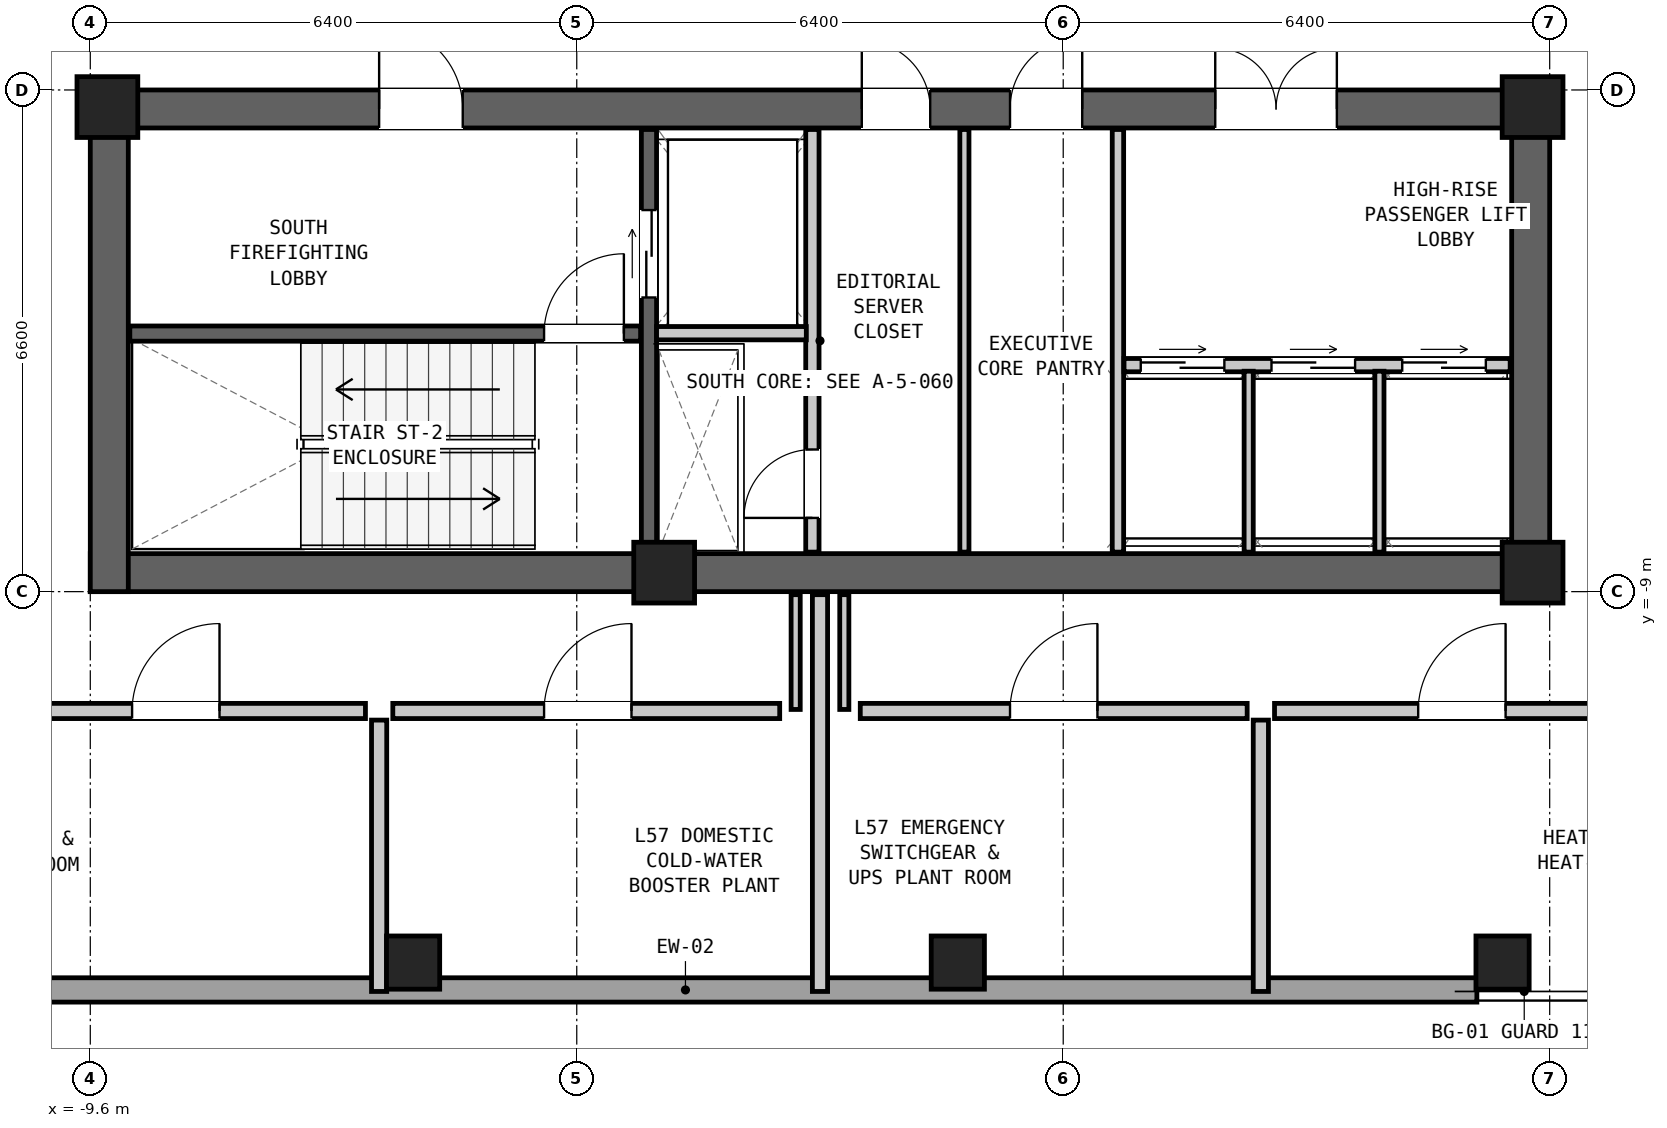
"""IFC4 building model, lengths in metres.
Left out: names, types, materials, properties, quantities, classifications, styles, units other than length and angle.
Written with IfcOpenShell. Run it as: python <this file> out.ifc"""

import sys

from ifc_helpers import new_model, si_unit, direction, frame, frame_2d, origin, origin_2d, place, context, subcontext, project, spatial, rectangle, hollow_rectangle, extrude, element, fill, save


model = new_model("IFC4")
c1 = context("Model", 3, precision=1e-05, world=origin(), true_north=direction((0.0, 1.0)))
c2 = subcontext(c1, "Body", "Model", "MODEL_VIEW")
j1 = project(units=[si_unit("LENGTHUNIT", "METRE"), si_unit("PLANEANGLEUNIT", "RADIAN")], contexts=[c1])
p1 = place(None, origin())
s1 = spatial("IfcSite", under=j1, at=p1, CompositionType="ELEMENT")
p2 = place(p1, origin())
s2 = spatial("IfcBuilding", under=s1, at=p2, CompositionType="ELEMENT")
p3 = place(p2, frame((0.0, 0.0, 195.15)))
s3 = spatial("IfcBuildingStorey", under=s2, at=p3, CompositionType="ELEMENT", Elevation=195.15)
p4 = place(p3, frame((-9.6, -8.75, 0.0), z_axis=(0.0, 0.0, 1.0), x_axis=(1.0, 0.0, 0.0)))
e1 = element("IfcWall", 1, at=p4, inside=s3, PredefinedType="SHEAR", context=c2, shape_type="SweptSolid", body=[
    extrude(rectangle(XDim=19.2, YDim=0.5, at=frame_2d((9.6, 0.0))), origin(), (0.0, 0.0, 1.0), 4.35),
])
p5 = place(p3, frame((-9.6, -2.65, 0.0), z_axis=(0.0, 0.0, 1.0), x_axis=(1.0, 0.0, 0.0)))
e2 = element("IfcWall", 2, at=p5, inside=s3, PredefinedType="SHEAR", context=c2, shape_type="SweptSolid", body=[
    extrude(rectangle(XDim=19.2, YDim=0.5, at=frame_2d((9.6, 0.0))), origin(), (0.0, 0.0, 1.0), 4.35),
])
p6 = place(p5, frame((3.8, 0.0, 0.0)))
e3 = element("IfcOpeningElement", 3, at=p6, cuts=e2, PredefinedType="OPENING", context=c2, shape_type="SweptSolid", body=[
    extrude(rectangle(XDim=1.1, YDim=2.08, at=frame_2d((0.55, 1.04))), frame((0.0, 0.262, 0.0), z_axis=(0.0, -1.0, 0.0), x_axis=(1.0, 0.0, 0.0)), (0.0, 0.0, 1.0), 0.524),
])
p7 = place(p5, frame((10.15, 0.0, 0.0)))
e4 = element("IfcOpeningElement", 4, at=p7, cuts=e2, PredefinedType="OPENING", context=c2, shape_type="SweptSolid", body=[
    extrude(rectangle(XDim=0.9, YDim=2.05, at=frame_2d((0.45, 1.025))), frame((0.0, 0.262, 0.0), z_axis=(0.0, -1.0, 0.0), x_axis=(1.0, 0.0, 0.0)), (0.0, 0.0, 1.0), 0.524),
])
p8 = place(p5, frame((12.1, 0.0, 0.0)))
e5 = element("IfcOpeningElement", 5, at=p8, cuts=e2, PredefinedType="OPENING", context=c2, shape_type="SweptSolid", body=[
    extrude(rectangle(XDim=0.95, YDim=2.1, at=frame_2d((0.475, 1.05))), frame((0.0, 0.262, 0.0), z_axis=(0.0, -1.0, 0.0), x_axis=(1.0, 0.0, 0.0)), (0.0, 0.0, 1.0), 0.524),
])
p9 = place(p5, frame((14.8, 0.0, 0.0)))
e6 = element("IfcOpeningElement", 6, at=p9, cuts=e2, PredefinedType="OPENING", context=c2, shape_type="SweptSolid", body=[
    extrude(rectangle(XDim=1.6, YDim=2.12, at=frame_2d((0.8, 1.06))), frame((0.0, 0.262, 0.0), z_axis=(0.0, -1.0, 0.0), x_axis=(1.0, 0.0, 0.0)), (0.0, 0.0, 1.0), 0.524),
])
for number, where, z_axis, x_axis in (
    (7, (-9.35, -9.0, 0.0), (0.0, 0.0, 1.0), (0.0, 1.0, 0.0)),
    (8, (9.35, -9.0, 0.0), (0.0, 0.0, 1.0), (0.0, 1.0, 0.0)),
):
    element("IfcWall", number, at=place(p3, frame(where, z_axis=z_axis, x_axis=x_axis)), inside=s3, PredefinedType="SHEAR", context=c2, shape_type="SweptSolid", body=[
        extrude(rectangle(XDim=6.6, YDim=0.5, at=frame_2d((3.3, 0.0))), origin(), (0.0, 0.0, 1.0), 4.35),
    ])
for number, where, z_axis, x_axis in (
    (9, (-5.353, -13.88, 0.0), (0.0, 0.0, 1.0), (1.0, 0.0, 0.0)),
    (10, (1.813, -13.88, 0.0), (0.0, 0.0, 1.0), (1.0, 0.0, 0.0)),
    (11, (8.98, -13.88, 0.0), (0.0, 0.0, 1.0), (1.0, 0.0, 0.0)),
):
    element("IfcColumn", number, at=place(p3, frame(where, z_axis=z_axis, x_axis=x_axis)), inside=s3, PredefinedType="COLUMN", context=c2, shape_type="SweptSolid", body=[
        extrude(hollow_rectangle(XDim=0.7, YDim=0.7, WallThickness=0.045, at=origin_2d()), origin(), (0.0, 0.0, 1.0), 4.35),
    ])
for number, where, z_axis, x_axis in (
    (12, (-9.375, -2.625, 0.0), (0.0, 0.0, 1.0), (1.0, 0.0, 0.0)),
    (13, (9.375, -2.625, 0.0), (0.0, 0.0, 1.0), (1.0, 0.0, 0.0)),
    (14, (-2.05, -8.75, 0.0), (0.0, 0.0, 1.0), (1.0, 0.0, 0.0)),
    (15, (9.375, -8.75, 0.0), (0.0, 0.0, 1.0), (1.0, 0.0, 0.0)),
):
    element("IfcColumn", number, at=place(p3, frame(where, z_axis=z_axis, x_axis=x_axis)), inside=s3, PredefinedType="COLUMN", context=c2, shape_type="SweptSolid", body=[
        extrude(rectangle(XDim=0.8, YDim=0.8, at=origin_2d()), origin(), (0.0, 0.0, 1.0), 4.35),
    ])
p10 = place(p3, frame((8.642, -14.24, 0.0), z_axis=(0.0, 0.0, 1.0), x_axis=(-1.0, 0.0, 0.0)))
e16 = element("IfcWall", 16, at=p10, inside=s3, PredefinedType="SOLIDWALL", context=c2, shape_type="SweptSolid", body=[
    extrude(rectangle(XDim=20.824, YDim=0.32, at=frame_2d((10.412, 0.0))), origin(), (0.0, 0.0, 1.0), 2.34),
])
p11 = place(p3, frame((-9.08, -5.605, 0.0), z_axis=(0.0, 0.0, 1.0), x_axis=(1.0, 0.0, 0.0)))
e17 = element("IfcWall", 17, at=p11, inside=s3, PredefinedType="SHEAR", context=c2, shape_type="SweptSolid", body=[
    extrude(rectangle(XDim=6.72, YDim=0.2, at=frame_2d((3.36, 0.0))), origin(), (0.0, 0.0, 1.0), 4.16),
])
p12 = place(p11, frame((5.45, 0.0, 0.0)))
e18 = element("IfcOpeningElement", 18, at=p12, cuts=e17, PredefinedType="OPENING", context=c2, shape_type="SweptSolid", body=[
    extrude(rectangle(XDim=1.05, YDim=2.08, at=frame_2d((0.525, 1.04))), frame((0.0, 0.112, 0.0), z_axis=(0.0, -1.0, 0.0), x_axis=(1.0, 0.0, 0.0)), (0.0, 0.0, 1.0), 0.224),
])
p13 = place(p3, frame((-2.25, -8.48, 0.0), z_axis=(0.0, 0.0, 1.0), x_axis=(0.0, 1.0, 0.0)))
e19 = element("IfcWall", 19, at=p13, inside=s3, PredefinedType="SHEAR", context=c2, shape_type="SweptSolid", body=[
    extrude(rectangle(XDim=5.56, YDim=0.2, at=frame_2d((2.78, 0.0))), origin(), (0.0, 0.0, 1.0), 4.16),
])
p14 = place(p13, frame((3.35, 0.0, 0.0)))
e20 = element("IfcOpeningElement", 20, at=p14, cuts=e19, PredefinedType="OPENING", context=c2, shape_type="SweptSolid", body=[
    extrude(rectangle(XDim=1.15, YDim=2.08, at=frame_2d((0.575, 1.04))), frame((0.0, 0.112, 0.0), z_axis=(0.0, -1.0, 0.0), x_axis=(1.0, 0.0, 0.0)), (0.0, 0.0, 1.0), 0.224),
])
p15 = place(p3, frame((-0.1, -8.48, 0.0), z_axis=(0.0, 0.0, 1.0), x_axis=(0.0, 1.0, 0.0)))
e21 = element("IfcWall", 21, at=p15, inside=s3, PredefinedType="PARTITIONING", context=c2, shape_type="SweptSolid", body=[
    extrude(rectangle(XDim=5.56, YDim=0.175, at=frame_2d((2.78, 0.0))), origin(), (0.0, 0.0, 1.0), 4.16),
])
p16 = place(p15, frame((0.45, 0.0, 0.0)))
e22 = element("IfcOpeningElement", 22, at=p16, cuts=e21, PredefinedType="OPENING", context=c2, shape_type="SweptSolid", body=[
    extrude(rectangle(XDim=0.9, YDim=2.05, at=frame_2d((0.45, 1.025))), frame((0.0, 0.1, 0.0), z_axis=(0.0, -1.0, 0.0), x_axis=(1.0, 0.0, 0.0)), (0.0, 0.0, 1.0), 0.199),
])
p17 = place(p3, frame((-2.15, -5.6, 0.0), z_axis=(0.0, 0.0, 1.0), x_axis=(1.0, 0.0, 0.0)))
e23 = element("IfcWall", 23, at=p17, inside=s3, PredefinedType="PARTITIONING", context=c2, shape_type="SweptSolid", body=[
    extrude(rectangle(XDim=1.97, YDim=0.175, at=frame_2d((0.985, 0.0))), origin(), (0.0, 0.0, 1.0), 4.16),
])
p18 = place(p3, frame((3.92, -8.48, 0.0), z_axis=(0.0, 0.0, 1.0), x_axis=(0.0, 1.0, 0.0)))
e24 = element("IfcWall", 24, at=p18, inside=s3, PredefinedType="PARTITIONING", context=c2, shape_type="SweptSolid", body=[
    extrude(rectangle(XDim=5.56, YDim=0.15, at=frame_2d((2.78, 0.0))), origin(), (0.0, 0.0, 1.0), 4.16),
])
p19 = place(p3, frame((1.9, -8.48, 0.0), z_axis=(0.0, 0.0, 1.0), x_axis=(0.0, 1.0, 0.0)))
e25 = element("IfcWall", 25, at=p19, inside=s3, PredefinedType="PARTITIONING", context=c2, shape_type="SweptSolid", body=[
    extrude(rectangle(XDim=5.56, YDim=0.12, at=frame_2d((2.78, 0.0))), origin(), (0.0, 0.0, 1.0), 4.16),
])
p20 = place(p3, frame((4.0, -6.02, 0.0), z_axis=(0.0, 0.0, 1.0), x_axis=(1.0, 0.0, 0.0)))
e26 = element("IfcWall", 26, at=p20, inside=s3, PredefinedType="PARTITIONING", context=c2, shape_type="SweptSolid", body=[
    extrude(rectangle(XDim=5.08, YDim=0.175, at=frame_2d((2.54, 0.0))), origin(), (0.0, 0.0, 1.0), 4.16),
])
p21 = place(p20, frame((0.22, 0.0, 0.0)))
e27 = element("IfcOpeningElement", 27, at=p21, cuts=e26, PredefinedType="OPENING", context=c2, shape_type="SweptSolid", body=[
    extrude(rectangle(XDim=1.1, YDim=2.06, at=frame_2d((0.55, 1.03))), frame((0.0, 0.1, 0.0), z_axis=(0.0, -1.0, 0.0), x_axis=(1.0, 0.0, 0.0)), (0.0, 0.0, 1.0), 0.199),
])
p22 = place(p20, frame((1.94, 0.0, 0.0)))
e28 = element("IfcOpeningElement", 28, at=p22, cuts=e26, PredefinedType="OPENING", context=c2, shape_type="SweptSolid", body=[
    extrude(rectangle(XDim=1.1, YDim=2.06, at=frame_2d((0.55, 1.03))), frame((0.0, 0.1, 0.0), z_axis=(0.0, -1.0, 0.0), x_axis=(1.0, 0.0, 0.0)), (0.0, 0.0, 1.0), 0.199),
])
p23 = place(p20, frame((3.66, 0.0, 0.0)))
e29 = element("IfcOpeningElement", 29, at=p23, cuts=e26, PredefinedType="OPENING", context=c2, shape_type="SweptSolid", body=[
    extrude(rectangle(XDim=1.1, YDim=2.06, at=frame_2d((0.55, 1.03))), frame((0.0, 0.1, 0.0), z_axis=(0.0, -1.0, 0.0), x_axis=(1.0, 0.0, 0.0)), (0.0, 0.0, 1.0), 0.199),
])
for number, where, z_axis, x_axis in (
    (30, (5.64, -8.48, 0.0), (0.0, 0.0, 1.0), (0.0, 1.0, 0.0)),
    (31, (7.36, -8.48, 0.0), (0.0, 0.0, 1.0), (0.0, 1.0, 0.0)),
):
    element("IfcWall", number, at=place(p3, frame(where, z_axis=z_axis, x_axis=x_axis)), inside=s3, PredefinedType="PARTITIONING", context=c2, shape_type="SweptSolid", body=[
        extrude(rectangle(XDim=2.38, YDim=0.12, at=frame_2d((1.19, 0.0))), origin(), (0.0, 0.0, 1.0), 4.16),
    ])
p24 = place(p3, frame((0.0, -14.26, 0.0), z_axis=(0.0, 0.0, 1.0), x_axis=(0.0, 1.0, 0.0)))
e32 = element("IfcWall", 32, at=p24, inside=s3, PredefinedType="PARTITIONING", context=c2, shape_type="SweptSolid", body=[
    extrude(rectangle(XDim=5.22, YDim=0.2, at=frame_2d((2.61, 0.0))), origin(), (0.0, 0.0, 1.0), 2.34),
])
for number, where, z_axis, x_axis in (
    (33, (-0.32, -10.55, 0.0), (0.0, 0.0, 1.0), (0.0, 1.0, 0.0)),
    (34, (0.32, -10.55, 0.0), (0.0, 0.0, 1.0), (0.0, 1.0, 0.0)),
):
    element("IfcWall", number, at=place(p3, frame(where, z_axis=z_axis, x_axis=x_axis)), inside=s3, PredefinedType="PARTITIONING", context=c2, shape_type="SweptSolid", body=[
        extrude(rectangle(XDim=1.51, YDim=0.12, at=frame_2d((0.755, 0.0))), origin(), (0.0, 0.0, 1.0), 2.34),
    ])
p25 = place(p3, frame((-10.97, -10.57, 0.0), z_axis=(0.0, 0.0, 1.0), x_axis=(1.0, 0.0, 0.0)))
e35 = element("IfcWall", 35, at=p25, inside=s3, PredefinedType="PARTITIONING", context=c2, shape_type="SweptSolid", body=[
    extrude(rectangle(XDim=4.99, YDim=0.2, at=frame_2d((2.495, 0.0))), origin(), (0.0, 0.0, 1.0), 4.16),
])
p26 = place(p25, frame((1.92, 0.0, 0.0)))
e36 = element("IfcOpeningElement", 36, at=p26, cuts=e35, PredefinedType="OPENING", context=c2, shape_type="SweptSolid", body=[
    extrude(rectangle(XDim=1.15, YDim=2.1, at=frame_2d((0.575, 1.05))), frame((0.0, 0.112, 0.0), z_axis=(0.0, -1.0, 0.0), x_axis=(1.0, 0.0, 0.0)), (0.0, 0.0, 1.0), 0.224),
])
p27 = place(p3, frame((-5.8, -14.26, 0.0), z_axis=(0.0, 0.0, 1.0), x_axis=(0.0, 1.0, 0.0)))
e37 = element("IfcWall", 37, at=p27, inside=s3, PredefinedType="PARTITIONING", context=c2, shape_type="SweptSolid", body=[
    extrude(rectangle(XDim=3.57, YDim=0.2, at=frame_2d((1.785, 0.0))), origin(), (0.0, 0.0, 1.0), 3.681),
])
p28 = place(p3, frame((-5.62, -10.57, 0.0), z_axis=(0.0, 0.0, 1.0), x_axis=(1.0, 0.0, 0.0)))
e38 = element("IfcWall", 38, at=p28, inside=s3, PredefinedType="PARTITIONING", context=c2, shape_type="SweptSolid", body=[
    extrude(rectangle(XDim=5.09, YDim=0.2, at=frame_2d((2.545, 0.0))), origin(), (0.0, 0.0, 1.0), 4.16),
])
p29 = place(p28, frame((1.99, 0.0, 0.0)))
e39 = element("IfcOpeningElement", 39, at=p29, cuts=e38, PredefinedType="OPENING", context=c2, shape_type="SweptSolid", body=[
    extrude(rectangle(XDim=1.15, YDim=2.1, at=frame_2d((0.575, 1.05))), frame((0.0, 0.112, 0.0), z_axis=(0.0, -1.0, 0.0), x_axis=(1.0, 0.0, 0.0)), (0.0, 0.0, 1.0), 0.224),
])
p30 = place(p3, frame((0.53, -10.57, 0.0), z_axis=(0.0, 0.0, 1.0), x_axis=(1.0, 0.0, 0.0)))
e40 = element("IfcWall", 40, at=p30, inside=s3, PredefinedType="PARTITIONING", context=c2, shape_type="SweptSolid", body=[
    extrude(rectangle(XDim=5.09, YDim=0.2, at=frame_2d((2.545, 0.0))), origin(), (0.0, 0.0, 1.0), 4.16),
])
p31 = place(p30, frame((1.97, 0.0, 0.0)))
e41 = element("IfcOpeningElement", 41, at=p31, cuts=e40, PredefinedType="OPENING", context=c2, shape_type="SweptSolid", body=[
    extrude(rectangle(XDim=1.15, YDim=2.1, at=frame_2d((0.575, 1.05))), frame((0.0, 0.112, 0.0), z_axis=(0.0, -1.0, 0.0), x_axis=(1.0, 0.0, 0.0)), (0.0, 0.0, 1.0), 0.224),
])
p32 = place(p3, frame((5.8, -14.26, 0.0), z_axis=(0.0, 0.0, 1.0), x_axis=(0.0, 1.0, 0.0)))
e42 = element("IfcWall", 42, at=p32, inside=s3, PredefinedType="PARTITIONING", context=c2, shape_type="SweptSolid", body=[
    extrude(rectangle(XDim=3.57, YDim=0.2, at=frame_2d((1.785, 0.0))), origin(), (0.0, 0.0, 1.0), 3.681),
])
p33 = place(p3, frame((5.98, -10.57, 0.0), z_axis=(0.0, 0.0, 1.0), x_axis=(1.0, 0.0, 0.0)))
e43 = element("IfcWall", 43, at=p33, inside=s3, PredefinedType="PARTITIONING", context=c2, shape_type="SweptSolid", body=[
    extrude(rectangle(XDim=4.99, YDim=0.2, at=frame_2d((2.495, 0.0))), origin(), (0.0, 0.0, 1.0), 4.16),
])
p34 = place(p33, frame((1.89, 0.0, 0.0)))
e44 = element("IfcOpeningElement", 44, at=p34, cuts=e43, PredefinedType="OPENING", context=c2, shape_type="SweptSolid", body=[
    extrude(rectangle(XDim=1.15, YDim=2.1, at=frame_2d((0.575, 1.05))), frame((0.0, 0.112, 0.0), z_axis=(0.0, -1.0, 0.0), x_axis=(1.0, 0.0, 0.0)), (0.0, 0.0, 1.0), 0.224),
])
p35 = place(p12, origin())
e45 = element("IfcDoor", 45, at=p35, inside=s3, OperationType="SINGLE_SWING_RIGHT", PredefinedType="DOOR", context=c2, shape_type="SweptSolid", body=[
    extrude(rectangle(XDim=1.05, YDim=2.08, at=frame_2d((0.525, 1.04))), frame((0.0, 0.025, 0.0), z_axis=(0.0, -1.0, 0.0), x_axis=(1.0, 0.0, 0.0)), (0.0, 0.0, 1.0), 0.05),
])
fill(e18, e45)
p36 = place(p6, origin())
e46 = element("IfcDoor", 46, at=p36, inside=s3, OperationType="SINGLE_SWING_LEFT", PredefinedType="DOOR", context=c2, shape_type="SweptSolid", body=[
    extrude(rectangle(XDim=1.1, YDim=2.08, at=frame_2d((0.55, 1.04))), frame((0.0, 0.025, 0.0), z_axis=(0.0, -1.0, 0.0), x_axis=(1.0, 0.0, 0.0)), (0.0, 0.0, 1.0), 0.05),
])
fill(e3, e46)
p37 = place(p14, origin())
e47 = element("IfcDoor", 47, at=p37, inside=s3, OperationType="DOUBLE_DOOR_SLIDING", PredefinedType="DOOR", context=c2, shape_type="SweptSolid", body=[
    extrude(rectangle(XDim=1.15, YDim=2.08, at=frame_2d((0.575, 1.04))), frame((0.0, 0.025, 0.0), z_axis=(0.0, -1.0, 0.0), x_axis=(1.0, 0.0, 0.0)), (0.0, 0.0, 1.0), 0.05),
])
fill(e20, e47)
p38 = place(p16, origin())
e48 = element("IfcDoor", 48, at=p38, inside=s3, OperationType="SINGLE_SWING_LEFT", PredefinedType="DOOR", context=c2, shape_type="SweptSolid", body=[
    extrude(rectangle(XDim=0.9, YDim=2.05, at=frame_2d((0.45, 1.025))), frame((0.0, 0.025, 0.0), z_axis=(0.0, -1.0, 0.0), x_axis=(1.0, 0.0, 0.0)), (0.0, 0.0, 1.0), 0.05),
])
fill(e22, e48)
p39 = place(p7, origin())
e49 = element("IfcDoor", 49, at=p39, inside=s3, OperationType="SINGLE_SWING_LEFT", PredefinedType="DOOR", context=c2, shape_type="SweptSolid", body=[
    extrude(rectangle(XDim=0.9, YDim=2.05, at=frame_2d((0.45, 1.025))), frame((0.0, 0.025, 0.0), z_axis=(0.0, -1.0, 0.0), x_axis=(1.0, 0.0, 0.0)), (0.0, 0.0, 1.0), 0.05),
])
fill(e4, e49)
p40 = place(p8, origin())
e50 = element("IfcDoor", 50, at=p40, inside=s3, OperationType="SINGLE_SWING_RIGHT", PredefinedType="DOOR", context=c2, shape_type="SweptSolid", body=[
    extrude(rectangle(XDim=0.95, YDim=2.1, at=frame_2d((0.475, 1.05))), frame((0.0, 0.025, 0.0), z_axis=(0.0, -1.0, 0.0), x_axis=(1.0, 0.0, 0.0)), (0.0, 0.0, 1.0), 0.05),
])
fill(e5, e50)
p41 = place(p21, origin())
e51 = element("IfcDoor", 51, at=p41, inside=s3, OperationType="DOUBLE_DOOR_SLIDING", PredefinedType="DOOR", context=c2, shape_type="SweptSolid", body=[
    extrude(rectangle(XDim=1.1, YDim=2.06, at=frame_2d((0.55, 1.03))), frame((0.0, 0.025, 0.0), z_axis=(0.0, -1.0, 0.0), x_axis=(1.0, 0.0, 0.0)), (0.0, 0.0, 1.0), 0.05),
])
fill(e27, e51)
p42 = place(p22, origin())
e52 = element("IfcDoor", 52, at=p42, inside=s3, OperationType="DOUBLE_DOOR_SLIDING", PredefinedType="DOOR", context=c2, shape_type="SweptSolid", body=[
    extrude(rectangle(XDim=1.1, YDim=2.06, at=frame_2d((0.55, 1.03))), frame((0.0, 0.025, 0.0), z_axis=(0.0, -1.0, 0.0), x_axis=(1.0, 0.0, 0.0)), (0.0, 0.0, 1.0), 0.05),
])
fill(e28, e52)
p43 = place(p23, origin())
e53 = element("IfcDoor", 53, at=p43, inside=s3, OperationType="DOUBLE_DOOR_SLIDING", PredefinedType="DOOR", context=c2, shape_type="SweptSolid", body=[
    extrude(rectangle(XDim=1.1, YDim=2.06, at=frame_2d((0.55, 1.03))), frame((0.0, 0.025, 0.0), z_axis=(0.0, -1.0, 0.0), x_axis=(1.0, 0.0, 0.0)), (0.0, 0.0, 1.0), 0.05),
])
fill(e29, e53)
p44 = place(p9, origin())
e54 = element("IfcDoor", 54, at=p44, inside=s3, OperationType="DOUBLE_DOOR_SINGLE_SWING", PredefinedType="DOOR", context=c2, shape_type="SweptSolid", body=[
    extrude(rectangle(XDim=1.6, YDim=2.12, at=frame_2d((0.8, 1.06))), frame((0.0, 0.025, 0.0), z_axis=(0.0, -1.0, 0.0), x_axis=(1.0, 0.0, 0.0)), (0.0, 0.0, 1.0), 0.05),
])
fill(e6, e54)
p45 = place(p26, origin())
e55 = element("IfcDoor", 55, at=p45, inside=s3, OperationType="SINGLE_SWING_RIGHT", PredefinedType="DOOR", context=c2, shape_type="SweptSolid", body=[
    extrude(rectangle(XDim=1.15, YDim=2.1, at=frame_2d((0.575, 1.05))), frame((0.0, 0.025, 0.0), z_axis=(0.0, -1.0, 0.0), x_axis=(1.0, 0.0, 0.0)), (0.0, 0.0, 1.0), 0.05),
])
fill(e36, e55)
p46 = place(p29, origin())
e56 = element("IfcDoor", 56, at=p46, inside=s3, OperationType="SINGLE_SWING_RIGHT", PredefinedType="DOOR", context=c2, shape_type="SweptSolid", body=[
    extrude(rectangle(XDim=1.15, YDim=2.1, at=frame_2d((0.575, 1.05))), frame((0.0, 0.025, 0.0), z_axis=(0.0, -1.0, 0.0), x_axis=(1.0, 0.0, 0.0)), (0.0, 0.0, 1.0), 0.05),
])
fill(e39, e56)
p47 = place(p31, origin())
e57 = element("IfcDoor", 57, at=p47, inside=s3, OperationType="SINGLE_SWING_RIGHT", PredefinedType="DOOR", context=c2, shape_type="SweptSolid", body=[
    extrude(rectangle(XDim=1.15, YDim=2.1, at=frame_2d((0.575, 1.05))), frame((0.0, 0.025, 0.0), z_axis=(0.0, -1.0, 0.0), x_axis=(1.0, 0.0, 0.0)), (0.0, 0.0, 1.0), 0.05),
])
fill(e41, e57)
p48 = place(p34, origin())
e58 = element("IfcDoor", 58, at=p48, inside=s3, OperationType="SINGLE_SWING_RIGHT", PredefinedType="DOOR", context=c2, shape_type="SweptSolid", body=[
    extrude(rectangle(XDim=1.15, YDim=2.1, at=frame_2d((0.575, 1.05))), frame((0.0, 0.025, 0.0), z_axis=(0.0, -1.0, 0.0), x_axis=(1.0, 0.0, 0.0)), (0.0, 0.0, 1.0), 0.05),
])
fill(e44, e58)
save(model, sys.argv[1])
